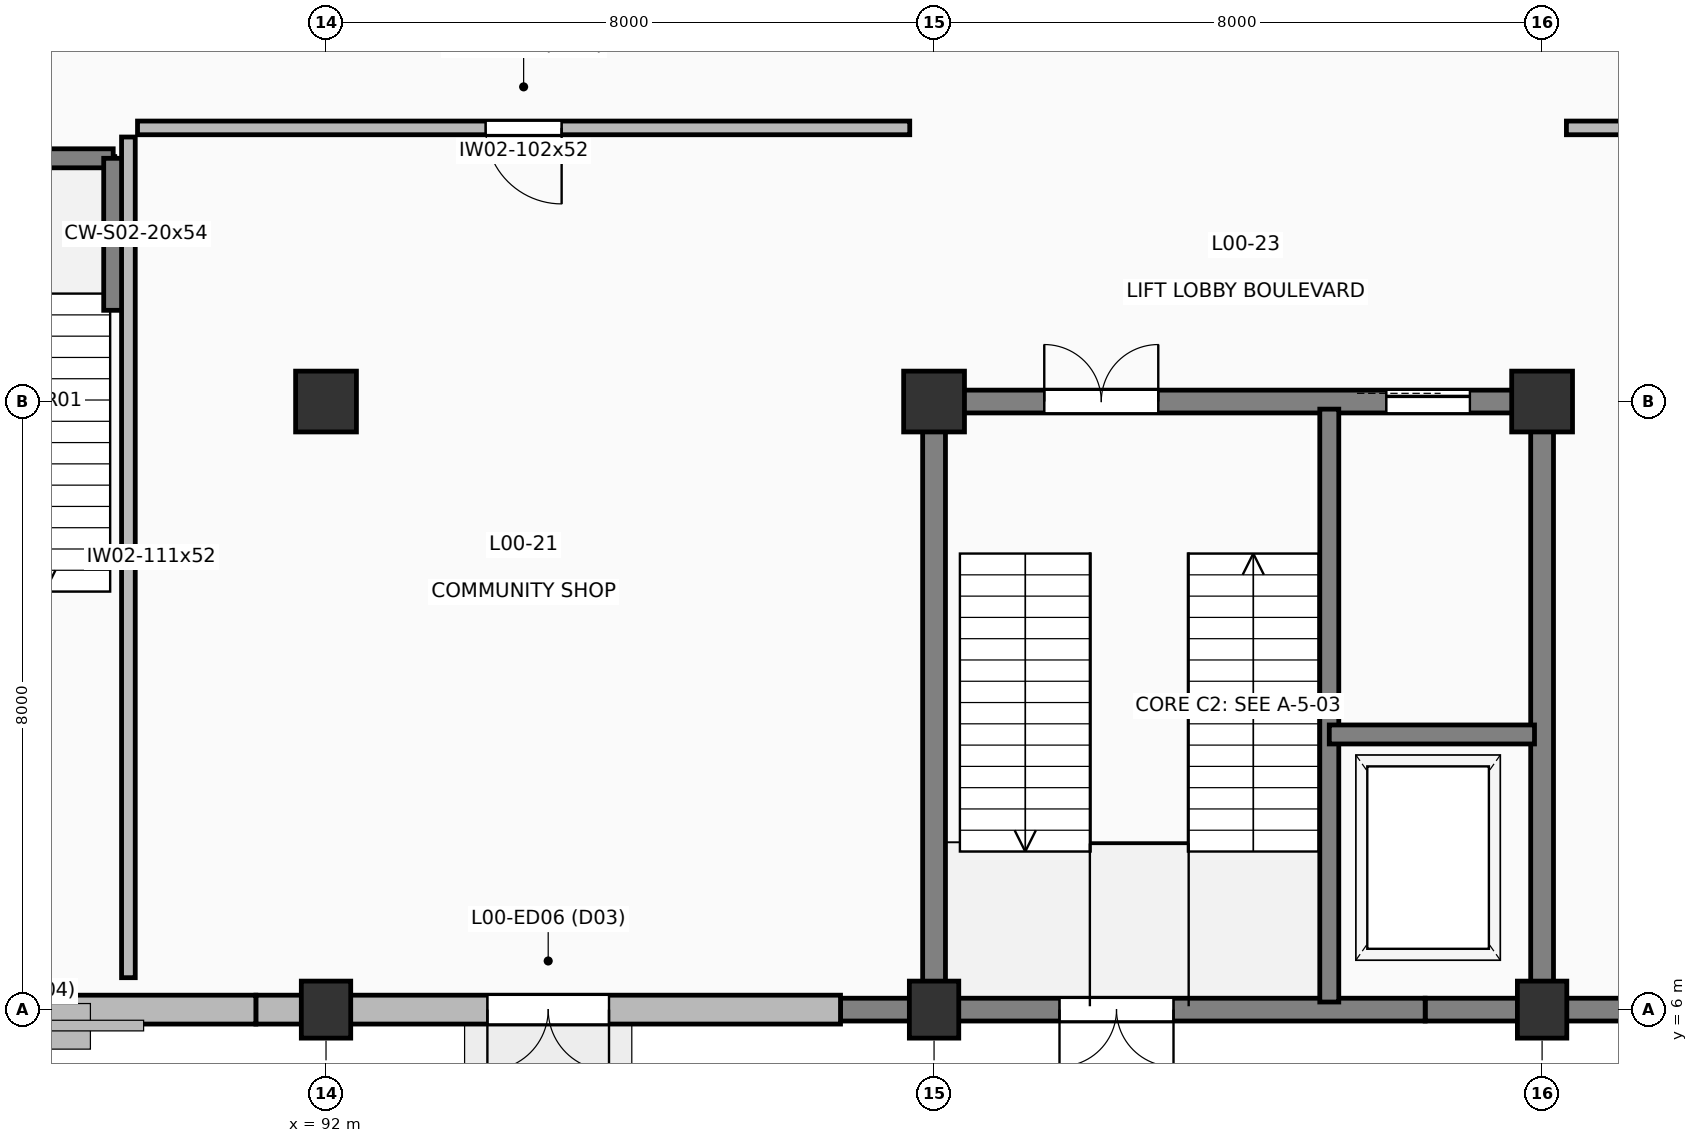
"""IFC4 building model, lengths in metres.
Left out: names, types, materials, properties, quantities, classifications, styles, units other than length and angle.
Written with IfcOpenShell. Run it as: python <this file> out.ifc"""

import sys

from ifc_helpers import new_model, si_unit, direction, frame, frame_2d, origin, origin_2d, place, context, subcontext, project, spatial, rectangle, extrude, element, fill, save


model = new_model("IFC4")
c1 = context("Model", 3, precision=1e-05, world=origin(), true_north=direction((0.0, 1.0)))
c2 = subcontext(c1, "Body", "Model", "MODEL_VIEW")
j1 = project(units=[si_unit("LENGTHUNIT", "METRE"), si_unit("PLANEANGLEUNIT", "RADIAN")], contexts=[c1])
p1 = place(None, origin())
s1 = spatial("IfcSite", under=j1, at=p1, CompositionType="ELEMENT")
p2 = place(p1, origin())
s2 = spatial("IfcBuilding", under=s1, at=p2, CompositionType="ELEMENT")
p3 = place(p2, origin())
s3 = spatial("IfcBuildingStorey", under=s2, at=p3, CompositionType="ELEMENT", Elevation=0.0)
p4 = place(p3, frame((92.0, 6.0, 0.0), z_axis=(0.0, 0.0, 1.0), x_axis=(1.0, 0.0, 0.0)))
e1 = element("IfcColumn", 1, at=p4, inside=s3, PredefinedType="PILASTER", context=c2, shape_type="SweptSolid", body=[
    extrude(rectangle(XDim=0.65, YDim=0.75, at=origin_2d()), origin(), (0.0, 0.0, 1.0), 5.4),
])
p5 = place(p3, frame((92.0, 14.0, 0.0), z_axis=(0.0, 0.0, 1.0), x_axis=(1.0, 0.0, 0.0)))
e2 = element("IfcColumn", 2, at=p5, inside=s3, PredefinedType="COLUMN", context=c2, shape_type="SweptSolid", body=[
    extrude(rectangle(XDim=0.8, YDim=0.8, at=origin_2d()), origin(), (0.0, 0.0, 1.0), 5.4),
])
p6 = place(p3, frame((100.0, 6.0, 0.0), z_axis=(0.0, 0.0, 1.0), x_axis=(1.0, 0.0, 0.0)))
e3 = element("IfcColumn", 3, at=p6, inside=s3, PredefinedType="PILASTER", context=c2, shape_type="SweptSolid", body=[
    extrude(rectangle(XDim=0.65, YDim=0.75, at=origin_2d()), origin(), (0.0, 0.0, 1.0), 5.4),
])
p7 = place(p3, frame((100.0, 14.0, 0.0), z_axis=(0.0, 0.0, 1.0), x_axis=(1.0, 0.0, 0.0)))
e4 = element("IfcColumn", 4, at=p7, inside=s3, PredefinedType="COLUMN", context=c2, shape_type="SweptSolid", body=[
    extrude(rectangle(XDim=0.8, YDim=0.8, at=origin_2d()), origin(), (0.0, 0.0, 1.0), 5.4),
])
p8 = place(p3, frame((108.0, 6.0, 0.0), z_axis=(0.0, 0.0, 1.0), x_axis=(1.0, 0.0, 0.0)))
e5 = element("IfcColumn", 5, at=p8, inside=s3, PredefinedType="PILASTER", context=c2, shape_type="SweptSolid", body=[
    extrude(rectangle(XDim=0.65, YDim=0.75, at=origin_2d()), origin(), (0.0, 0.0, 1.0), 5.4),
])
p9 = place(p3, frame((108.0, 14.0, 0.0), z_axis=(0.0, 0.0, 1.0), x_axis=(1.0, 0.0, 0.0)))
e6 = element("IfcColumn", 6, at=p9, inside=s3, PredefinedType="COLUMN", context=c2, shape_type="SweptSolid", body=[
    extrude(rectangle(XDim=0.8, YDim=0.8, at=origin_2d()), origin(), (0.0, 0.0, 1.0), 5.4),
])
p10 = place(p3, frame((114.154, 6.0, 0.0), z_axis=(0.0, 0.0, 1.0), x_axis=(-1.0, 0.0, 0.0)))
e7 = element("IfcWall", 7, at=p10, inside=s3, PredefinedType="SOLIDWALL", context=c2, shape_type="SweptSolid", body=[
    extrude(rectangle(XDim=7.692, YDim=0.3, at=frame_2d((3.846, 0.0))), origin(), (0.0, 0.0, 1.0), 5.4),
])
p11 = place(p3, frame((106.461, 6.0, 0.0), z_axis=(0.0, 0.0, 1.0), x_axis=(-1.0, 0.0, 0.0)))
e8 = element("IfcWall", 8, at=p11, inside=s3, PredefinedType="SOLIDWALL", context=c2, shape_type="SweptSolid", body=[
    extrude(rectangle(XDim=7.692, YDim=0.3, at=frame_2d((3.846, 0.0))), origin(), (0.0, 0.0, 1.0), 5.4),
])
p12 = place(p11, frame((3.311, 0.0, 0.0)))
e9 = element("IfcOpeningElement", 9, at=p12, cuts=e8, PredefinedType="OPENING", context=c2, shape_type="SweptSolid", body=[
    extrude(rectangle(XDim=1.5, YDim=2.2, at=frame_2d((0.75, 1.1))), frame((0.0, 0.16, 0.0), z_axis=(0.0, -1.0, 0.0), x_axis=(1.0, 0.0, 0.0)), (0.0, 0.0, 1.0), 0.32),
])
p13 = place(p3, frame((98.769, 6.0, 0.0), z_axis=(0.0, 0.0, 1.0), x_axis=(-1.0, 0.0, 0.0)))
e10 = element("IfcWall", 10, at=p13, inside=s3, PredefinedType="SOLIDWALL", context=c2, shape_type="SweptSolid", body=[
    extrude(rectangle(XDim=7.692, YDim=0.38, at=frame_2d((3.846, 0.0))), origin(), (0.0, 0.0, 1.0), 4.495),
])
p14 = place(p13, frame((3.046, 0.0, 0.0)))
e11 = element("IfcOpeningElement", 11, at=p14, cuts=e10, PredefinedType="OPENING", context=c2, shape_type="SweptSolid", body=[
    extrude(rectangle(XDim=1.6, YDim=2.2, at=frame_2d((0.8, 1.1))), frame((0.0, 0.2, 0.0), z_axis=(0.0, -1.0, 0.0), x_axis=(1.0, 0.0, 0.0)), (0.0, 0.0, 1.0), 0.4),
])
p15 = place(p3, frame((91.077, 6.0, 0.0), z_axis=(0.0, 0.0, 1.0), x_axis=(-1.0, 0.0, 0.0)))
e12 = element("IfcWall", 12, at=p15, inside=s3, PredefinedType="SOLIDWALL", context=c2, shape_type="SweptSolid", body=[
    extrude(rectangle(XDim=7.077, YDim=0.38, at=frame_2d((3.539, 0.0))), origin(), (0.0, 0.0, 1.0), 4.495),
])
p16 = place(p15, frame((2.738, 0.0, 0.85)))
e13 = element("IfcOpeningElement", 13, at=p16, cuts=e12, PredefinedType="OPENING", context=c2, shape_type="SweptSolid", body=[
    extrude(rectangle(XDim=1.6, YDim=2.0, at=frame_2d((0.8, 1.0))), frame((0.0, 0.2, 0.0), z_axis=(0.0, -1.0, 0.0), x_axis=(1.0, 0.0, 0.0)), (0.0, 0.0, 1.0), 0.4),
])
p17 = place(p3, frame((100.0, 6.0, 0.0), z_axis=(0.0, 0.0, 1.0), x_axis=(0.0, 1.0, 0.0)))
e14 = element("IfcWall", 14, at=p17, inside=s3, PredefinedType="SHEAR", context=c2, shape_type="SweptSolid", body=[
    extrude(rectangle(XDim=8.0, YDim=0.3, at=frame_2d((4.0, 0.0))), origin(), (0.0, 0.0, 1.0), 5.4),
])
p18 = place(p3, frame((100.0, 14.0, 0.0), z_axis=(0.0, 0.0, 1.0), x_axis=(1.0, 0.0, 0.0)))
e15 = element("IfcWall", 15, at=p18, inside=s3, PredefinedType="SHEAR", context=c2, shape_type="SweptSolid", body=[
    extrude(rectangle(XDim=8.0, YDim=0.3, at=frame_2d((4.0, 0.0))), origin(), (0.0, 0.0, 1.0), 5.4),
])
p19 = place(p18, frame((1.45, 0.0, 0.0)))
e16 = element("IfcOpeningElement", 16, at=p19, cuts=e15, PredefinedType="OPENING", context=c2, shape_type="SweptSolid", body=[
    extrude(rectangle(XDim=1.5, YDim=2.2, at=frame_2d((0.75, 1.1))), frame((0.0, 0.16, 0.0), z_axis=(0.0, -1.0, 0.0), x_axis=(1.0, 0.0, 0.0)), (0.0, 0.0, 1.0), 0.32),
])
p20 = place(p18, frame((5.95, 0.0, 0.0)))
e17 = element("IfcOpeningElement", 17, at=p20, cuts=e15, PredefinedType="OPENING", context=c2, shape_type="SweptSolid", body=[
    extrude(rectangle(XDim=1.1, YDim=2.2, at=frame_2d((0.55, 1.1))), frame((0.0, 0.16, 0.0), z_axis=(0.0, -1.0, 0.0), x_axis=(1.0, 0.0, 0.0)), (0.0, 0.0, 1.0), 0.32),
])
p21 = place(p3, frame((108.0, 14.0, 0.0), z_axis=(0.0, 0.0, 1.0), x_axis=(0.0, -1.0, 0.0)))
e18 = element("IfcWall", 18, at=p21, inside=s3, PredefinedType="SHEAR", context=c2, shape_type="SweptSolid", body=[
    extrude(rectangle(XDim=8.0, YDim=0.3, at=frame_2d((4.0, 0.0))), origin(), (0.0, 0.0, 1.0), 5.4),
])
p22 = place(p3, frame((105.2, 6.1, 0.0), z_axis=(0.0, 0.0, 1.0), x_axis=(0.0, 1.0, 0.0)))
e19 = element("IfcWall", 19, at=p22, inside=s3, PredefinedType="SHEAR", context=c2, shape_type="SweptSolid", body=[
    extrude(rectangle(XDim=7.8, YDim=0.25, at=frame_2d((3.9, 0.0))), origin(), (0.0, 0.0, 1.0), 5.4),
])
p23 = place(p3, frame((105.2, 9.62, 0.0), z_axis=(0.0, 0.0, 1.0), x_axis=(1.0, 0.0, 0.0)))
e20 = element("IfcWall", 20, at=p23, inside=s3, PredefinedType="SHEAR", context=c2, shape_type="SweptSolid", body=[
    extrude(rectangle(XDim=2.7, YDim=0.25, at=frame_2d((1.35, 0.0))), origin(), (0.0, 0.0, 1.0), 5.4),
])
p24 = place(p3, frame((84.4, 17.2, 0.0), z_axis=(0.0, 0.0, 1.0), x_axis=(1.0, 0.0, 0.0)))
e21 = element("IfcWall", 21, at=p24, inside=s3, PredefinedType="SHEAR", context=c2, shape_type="SweptSolid", body=[
    extrude(rectangle(XDim=4.8, YDim=0.25, at=frame_2d((2.4, 0.0))), origin(), (0.0, 0.0, 1.0), 5.4),
])
p25 = place(p3, frame((89.2, 17.2, 0.0), z_axis=(0.0, 0.0, 1.0), x_axis=(0.0, -1.0, 0.0)))
e22 = element("IfcWall", 22, at=p25, inside=s3, PredefinedType="SHEAR", context=c2, shape_type="SweptSolid", body=[
    extrude(rectangle(XDim=2.0, YDim=0.25, at=frame_2d((1.0, 0.0))), origin(), (0.0, 0.0, 1.0), 5.4),
])
p26 = place(p3, frame((99.68, 17.6, 0.0), z_axis=(0.0, 0.0, 1.0), x_axis=(-1.0, 0.0, 0.0)))
e23 = element("IfcWall", 23, at=p26, inside=s3, PredefinedType="PARTITIONING", context=c2, shape_type="SweptSolid", body=[
    extrude(rectangle(XDim=10.16, YDim=0.18, at=frame_2d((5.08, 0.0))), origin(), (0.0, 0.0, 1.0), 5.16),
])
p27 = place(p26, frame((4.58, 0.0, 0.0)))
e24 = element("IfcOpeningElement", 24, at=p27, cuts=e23, PredefinedType="OPENING", context=c2, shape_type="SweptSolid", body=[
    extrude(rectangle(XDim=1.0, YDim=2.15, at=frame_2d((0.5, 1.075))), frame((0.0, 0.1, 0.0), z_axis=(0.0, -1.0, 0.0), x_axis=(1.0, 0.0, 0.0)), (0.0, 0.0, 1.0), 0.2),
])
p28 = place(p3, frame((89.4, 17.48, 0.0), z_axis=(0.0, 0.0, 1.0), x_axis=(0.0, -1.0, 0.0)))
e25 = element("IfcWall", 25, at=p28, inside=s3, PredefinedType="PARTITIONING", context=c2, shape_type="SweptSolid", body=[
    extrude(rectangle(XDim=11.06, YDim=0.18, at=frame_2d((5.53, 0.0))), origin(), (0.0, 0.0, 1.0), 5.16),
])
p29 = place(p3, frame((123.68, 17.6, 0.0), z_axis=(0.0, 0.0, 1.0), x_axis=(-1.0, 0.0, 0.0)))
e26 = element("IfcWall", 26, at=p29, inside=s3, PredefinedType="PARTITIONING", context=c2, shape_type="SweptSolid", body=[
    extrude(rectangle(XDim=15.36, YDim=0.18, at=frame_2d((7.68, 0.0))), origin(), (0.0, 0.0, 1.0), 5.16),
])
p30 = place(p29, frame((7.18, 0.0, 0.0)))
e27 = element("IfcOpeningElement", 27, at=p30, cuts=e26, PredefinedType="OPENING", context=c2, shape_type="SweptSolid", body=[
    extrude(rectangle(XDim=1.0, YDim=2.15, at=frame_2d((0.5, 1.075))), frame((0.0, 0.1, 0.0), z_axis=(0.0, -1.0, 0.0), x_axis=(1.0, 0.0, 0.0)), (0.0, 0.0, 1.0), 0.2),
])
p31 = place(p14, origin())
e28 = element("IfcDoor", 28, at=p31, inside=s3, OperationType="DOUBLE_DOOR_SINGLE_SWING", PredefinedType="DOOR", context=c2, shape_type="SweptSolid", body=[
    extrude(rectangle(XDim=1.6, YDim=2.2, at=frame_2d((0.8, 1.1))), frame((0.0, 0.025, 0.0), z_axis=(0.0, -1.0, 0.0), x_axis=(1.0, 0.0, 0.0)), (0.0, 0.0, 1.0), 0.05),
])
fill(e11, e28)
p32 = place(p19, origin())
e29 = element("IfcDoor", 29, at=p32, inside=s3, OperationType="DOUBLE_DOOR_SINGLE_SWING", PredefinedType="DOOR", context=c2, shape_type="SweptSolid", body=[
    extrude(rectangle(XDim=1.5, YDim=2.2, at=frame_2d((0.75, 1.1))), frame((0.0, 0.025, 0.0), z_axis=(0.0, -1.0, 0.0), x_axis=(1.0, 0.0, 0.0)), (0.0, 0.0, 1.0), 0.05),
])
fill(e16, e29)
p33 = place(p12, origin())
e30 = element("IfcDoor", 30, at=p33, inside=s3, OperationType="DOUBLE_DOOR_SINGLE_SWING", PredefinedType="DOOR", context=c2, shape_type="SweptSolid", body=[
    extrude(rectangle(XDim=1.5, YDim=2.2, at=frame_2d((0.75, 1.1))), frame((0.0, 0.025, 0.0), z_axis=(0.0, -1.0, 0.0), x_axis=(1.0, 0.0, 0.0)), (0.0, 0.0, 1.0), 0.05),
])
fill(e9, e30)
p34 = place(p20, origin())
e31 = element("IfcDoor", 31, at=p34, inside=s3, OperationType="SLIDING_TO_LEFT", PredefinedType="DOOR", context=c2, shape_type="SweptSolid", body=[
    extrude(rectangle(XDim=1.1, YDim=2.2, at=frame_2d((0.55, 1.1))), frame((0.0, 0.025, 0.0), z_axis=(0.0, -1.0, 0.0), x_axis=(1.0, 0.0, 0.0)), (0.0, 0.0, 1.0), 0.05),
])
fill(e17, e31)
p35 = place(p27, origin())
e32 = element("IfcDoor", 32, at=p35, inside=s3, OperationType="SINGLE_SWING_LEFT", PredefinedType="DOOR", context=c2, shape_type="SweptSolid", body=[
    extrude(rectangle(XDim=1.0, YDim=2.15, at=frame_2d((0.5, 1.075))), frame((0.0, 0.025, 0.0), z_axis=(0.0, -1.0, 0.0), x_axis=(1.0, 0.0, 0.0)), (0.0, 0.0, 1.0), 0.05),
])
fill(e24, e32)
save(model, sys.argv[1])
